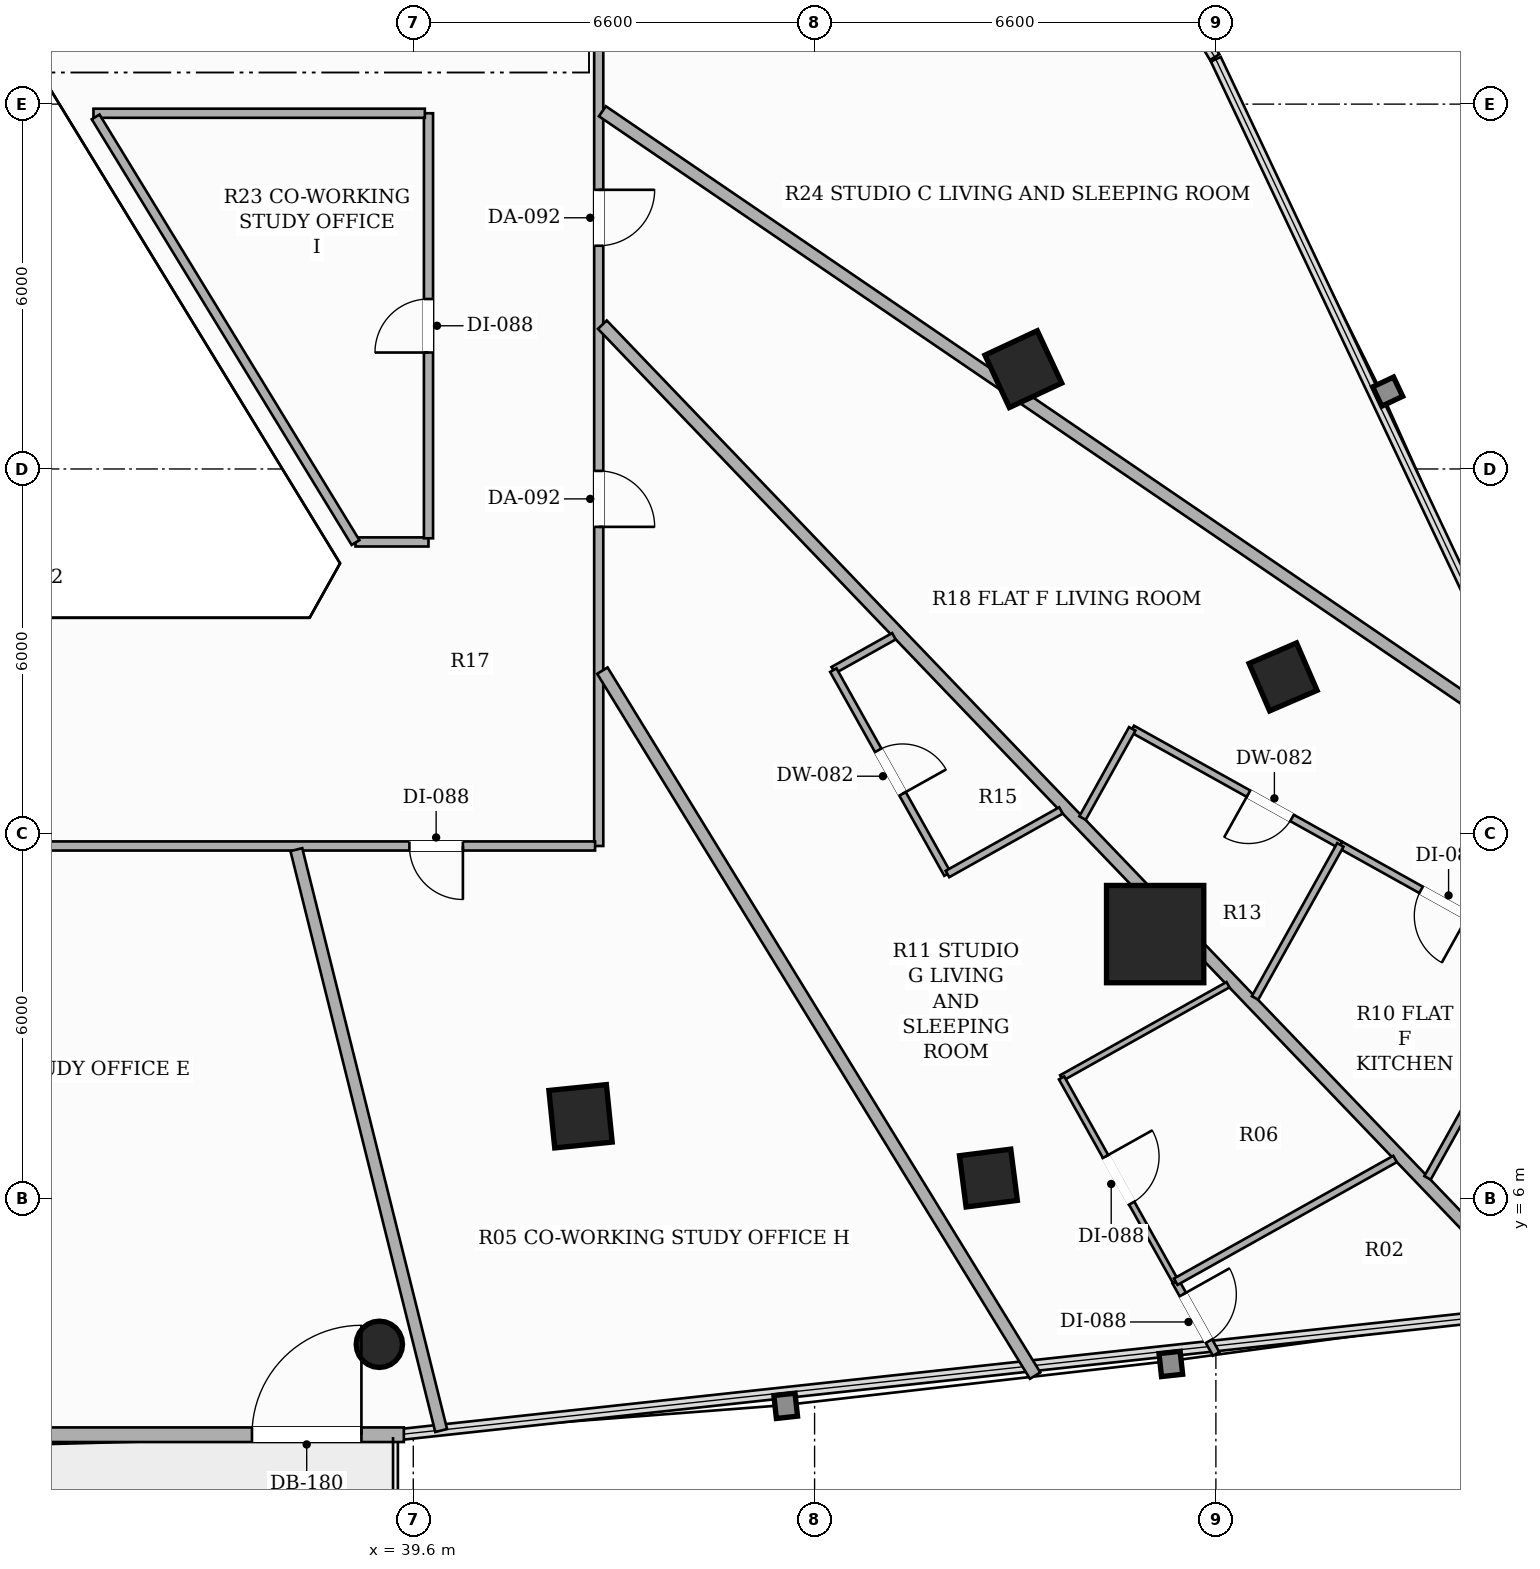
"""IFC4 building model, lengths in metres.
Left out: names, types, materials, properties, quantities, classifications, styles, units other than length and angle.
Written with IfcOpenShell. Run it as: python <this file> out.ifc"""

import sys

from ifc_helpers import new_model, si_unit, direction, frame, frame_2d, origin, origin_2d, place, context, subcontext, project, spatial, rectangle, hollow_rectangle, hollow_circle, extrude, element, fill, save


model = new_model("IFC4")
c1 = context("Model", 3, precision=1e-05, world=origin(), true_north=direction((0.0, 1.0)))
c2 = subcontext(c1, "Body", "Model", "MODEL_VIEW")
j1 = project(units=[si_unit("LENGTHUNIT", "METRE"), si_unit("PLANEANGLEUNIT", "RADIAN")], contexts=[c1])
p1 = place(None, origin())
s1 = spatial("IfcSite", under=j1, at=p1, CompositionType="ELEMENT")
p2 = place(p1, origin())
s2 = spatial("IfcBuilding", under=s1, at=p2, CompositionType="ELEMENT")
p3 = place(p2, frame((0.0, 0.0, 80.75)))
s3 = spatial("IfcBuildingStorey", under=s2, at=p3, CompositionType="ELEMENT", Elevation=80.75)
p4 = place(p3, frame((51.801, 10.351, 0.0), z_axis=(0.0, 0.0, 1.0), x_axis=(1.0, 0.0, 0.0)))
e1 = element("IfcColumn", 1, at=p4, inside=s3, PredefinedType="COLUMN", context=c2, shape_type="SweptSolid", body=[
    extrude(hollow_rectangle(XDim=1.6, YDim=1.6, WallThickness=0.05, at=origin_2d()), origin(), (0.0, 0.0, 1.0), 3.3),
])
for number, where, z_axis, x_axis in (
    (2, (42.351, 7.355, 0.0), (0.0, 0.0, 1.0), (0.995, 0.101, 0.0)),
    (3, (49.633, 19.642, 0.0), (0.0, 0.0, 1.0), (-0.423, 0.906, 0.0)),
):
    element("IfcColumn", number, at=place(p3, frame(where, z_axis=z_axis, x_axis=x_axis)), inside=s3, PredefinedType="COLUMN", context=c2, shape_type="SweptSolid", body=[
        extrude(hollow_rectangle(XDim=0.95, YDim=0.95, WallThickness=0.032, at=origin_2d()), origin(), (0.0, 0.0, 1.0), 3.3),
    ])
for number, where, z_axis, x_axis in (
    (4, (49.059, 6.339, 0.0), (0.0, 0.0, 1.0), (0.992, 0.127, 0.0)),
    (5, (53.905, 14.58, 0.0), (0.0, 0.0, 1.0), (-0.397, 0.918, 0.0)),
):
    element("IfcColumn", number, at=place(p3, frame(where, z_axis=z_axis, x_axis=x_axis)), inside=s3, PredefinedType="COLUMN", context=c2, shape_type="SweptSolid", body=[
        extrude(hollow_rectangle(XDim=0.85, YDim=0.85, WallThickness=0.028, at=origin_2d()), origin(), (0.0, 0.0, 1.0), 3.3),
    ])
p5 = place(p3, frame((39.042, 3.605, 0.0), z_axis=(0.0, 0.0, 1.0), x_axis=(1.0, 0.0, 0.0)))
e6 = element("IfcColumn", 6, at=p5, inside=s3, PredefinedType="COLUMN", context=c2, shape_type="SweptSolid", body=[
    extrude(hollow_circle(Radius=0.381, WallThickness=0.022, at=origin_2d()), origin(), (0.0, 0.0, 1.0), 3.3),
])
p6 = place(p3, frame((26.554, 2.118, 0.0), z_axis=(0.0, 0.0, 1.0), x_axis=(1.0, 0.0, 0.0)))
e7 = element("IfcWall", 7, at=p6, inside=s3, PredefinedType="SOLIDWALL", context=c2, shape_type="SweptSolid", body=[
    extrude(rectangle(XDim=12.891, YDim=0.24, at=frame_2d((6.446, 0.0))), origin(), (0.0, 0.0, 1.0), 2.624),
])
p7 = place(p6, frame((10.393, 0.0, 0.0)))
e8 = element("IfcOpeningElement", 8, at=p7, cuts=e7, PredefinedType="OPENING", context=c2, shape_type="SweptSolid", body=[
    extrude(rectangle(XDim=1.8, YDim=2.2, at=frame_2d((0.9, 1.1))), frame((0.0, 0.13, 0.0), z_axis=(0.0, -1.0, 0.0), x_axis=(1.0, 0.0, 0.0)), (0.0, 0.0, 1.0), 0.26),
])
p8 = place(p3, frame((42.65, 36.84, 0.0), z_axis=(0.0, 0.0, 1.0), x_axis=(0.0, -1.0, 0.0)))
e9 = element("IfcWall", 9, at=p8, inside=s3, PredefinedType="PARTITIONING", context=c2, shape_type="SweptSolid", body=[
    extrude(rectangle(XDim=25.04, YDim=0.15, at=frame_2d((12.52, 0.0))), origin(), (0.0, 0.0, 1.0), 2.413),
])
p9 = place(p8, frame((6.171, 0.0, 0.0)))
e10 = element("IfcOpeningElement", 10, at=p9, cuts=e9, PredefinedType="OPENING", context=c2, shape_type="SweptSolid", body=[
    extrude(rectangle(XDim=0.92, YDim=2.15, at=frame_2d((0.46, 1.075))), frame((0.0, 0.085, 0.0), z_axis=(0.0, -1.0, 0.0), x_axis=(1.0, 0.0, 0.0)), (0.0, 0.0, 1.0), 0.17),
])
p10 = place(p8, frame((14.249, 0.0, 0.0)))
e11 = element("IfcOpeningElement", 11, at=p10, cuts=e9, PredefinedType="OPENING", context=c2, shape_type="SweptSolid", body=[
    extrude(rectangle(XDim=0.92, YDim=2.15, at=frame_2d((0.46, 1.075))), frame((0.0, 0.085, 0.0), z_axis=(0.0, -1.0, 0.0), x_axis=(1.0, 0.0, 0.0)), (0.0, 0.0, 1.0), 0.17),
])
p11 = place(p8, frame((18.872, 0.0, 0.0)))
e12 = element("IfcOpeningElement", 12, at=p11, cuts=e9, PredefinedType="OPENING", context=c2, shape_type="SweptSolid", body=[
    extrude(rectangle(XDim=0.92, YDim=2.15, at=frame_2d((0.46, 1.075))), frame((0.0, 0.085, 0.0), z_axis=(0.0, -1.0, 0.0), x_axis=(1.0, 0.0, 0.0)), (0.0, 0.0, 1.0), 0.17),
])
p12 = place(p3, frame((42.59, 11.8, 0.0), z_axis=(0.0, 0.0, 1.0), x_axis=(-1.0, 0.0, 0.0)))
e13 = element("IfcWall", 13, at=p12, inside=s3, PredefinedType="PARTITIONING", context=c2, shape_type="SweptSolid", body=[
    extrude(rectangle(XDim=19.24, YDim=0.15, at=frame_2d((9.62, 0.0))), origin(), (0.0, 0.0, 1.0), 2.669),
])
p13 = place(p12, frame((9.24, 0.0, 0.0)))
e14 = element("IfcOpeningElement", 14, at=p13, cuts=e13, PredefinedType="OPENING", context=c2, shape_type="SweptSolid", body=[
    extrude(rectangle(XDim=0.88, YDim=2.1, at=frame_2d((0.44, 1.05))), frame((0.0, 0.085, 0.0), z_axis=(0.0, -1.0, 0.0), x_axis=(1.0, 0.0, 0.0)), (0.0, 0.0, 1.0), 0.17),
])
p14 = place(p12, frame((2.174, 0.0, 0.0)))
e15 = element("IfcOpeningElement", 15, at=p14, cuts=e13, PredefinedType="OPENING", context=c2, shape_type="SweptSolid", body=[
    extrude(rectangle(XDim=0.88, YDim=2.1, at=frame_2d((0.44, 1.05))), frame((0.0, 0.085, 0.0), z_axis=(0.0, -1.0, 0.0), x_axis=(1.0, 0.0, 0.0)), (0.0, 0.0, 1.0), 0.17),
])
p15 = place(p3, frame((38.65, 16.8, 0.0), z_axis=(0.0, 0.0, 1.0), x_axis=(1.0, 0.0, 0.0)))
e16 = element("IfcWall", 16, at=p15, inside=s3, PredefinedType="PARTITIONING", context=c2, shape_type="SweptSolid", body=[
    extrude(rectangle(XDim=1.2, YDim=0.15, at=frame_2d((0.6, 0.0))), origin(), (0.0, 0.0, 1.0), 3.06),
])
p16 = place(p3, frame((39.85, 16.86, 0.0), z_axis=(0.0, 0.0, 1.0), x_axis=(0.0, 1.0, 0.0)))
e17 = element("IfcWall", 17, at=p16, inside=s3, PredefinedType="PARTITIONING", context=c2, shape_type="SweptSolid", body=[
    extrude(rectangle(XDim=6.99, YDim=0.15, at=frame_2d((3.495, 0.0))), origin(), (0.0, 0.0, 1.0), 2.669),
])
p17 = place(p16, frame((3.055, 0.0, 0.0)))
e18 = element("IfcOpeningElement", 18, at=p17, cuts=e17, PredefinedType="OPENING", context=c2, shape_type="SweptSolid", body=[
    extrude(rectangle(XDim=0.88, YDim=2.1, at=frame_2d((0.44, 1.05))), frame((0.0, 0.085, 0.0), z_axis=(0.0, -1.0, 0.0), x_axis=(1.0, 0.0, 0.0)), (0.0, 0.0, 1.0), 0.17),
])
p18 = place(p3, frame((39.79, 23.85, 0.0), z_axis=(0.0, 0.0, 1.0), x_axis=(-1.0, 0.0, 0.0)))
e19 = element("IfcWall", 19, at=p18, inside=s3, PredefinedType="PARTITIONING", context=c2, shape_type="SweptSolid", body=[
    extrude(rectangle(XDim=5.45, YDim=0.15, at=frame_2d((2.725, 0.0))), origin(), (0.0, 0.0, 1.0), 2.669),
])
p19 = place(p3, frame((34.376, 23.79, 0.0), z_axis=(0.0, 0.0, 1.0), x_axis=(0.521108010454, -0.853490738931, 0.0)))
e20 = element("IfcWall", 20, at=p19, inside=s3, PredefinedType="PARTITIONING", context=c2, shape_type="SweptSolid", body=[
    extrude(rectangle(XDim=8.202, YDim=0.15, at=frame_2d((4.101, 0.0))), origin(), (0.0, 0.0, 1.0), 2.669),
])
p20 = place(p3, frame((58.165, 13.35, 0.0), z_axis=(0.0, 0.0, 1.0), x_axis=(-0.826341659386, 0.563169123766, 0.0)))
e21 = element("IfcWall", 21, at=p20, inside=s3, PredefinedType="PARTITIONING", context=c2, shape_type="SweptSolid", body=[
    extrude(rectangle(XDim=18.703, YDim=0.2, at=frame_2d((9.352, 0.0))), origin(), (0.0, 0.0, 1.0), 2.413),
])
p21 = place(p3, frame((37.677, 11.74, 0.0), z_axis=(0.0, 0.0, 1.0), x_axis=(0.241946282122, -0.970289645707, 0.0)))
e22 = element("IfcWall", 22, at=p21, inside=s3, PredefinedType="PARTITIONING", context=c2, shape_type="SweptSolid", body=[
    extrude(rectangle(XDim=9.845, YDim=0.2, at=frame_2d((4.923, 0.0))), origin(), (0.0, 0.0, 1.0), 2.413),
])
p22 = place(p3, frame((58.237, 4.179, 0.0), z_axis=(0.0, 0.0, 1.0), x_axis=(-0.69208567792, 0.721815360337, 0.0)))
e23 = element("IfcWall", 23, at=p22, inside=s3, PredefinedType="PARTITIONING", context=c2, shape_type="SweptSolid", body=[
    extrude(rectangle(XDim=22.435, YDim=0.2, at=frame_2d((11.218, 0.0))), origin(), (0.0, 0.0, 1.0), 2.413),
])
p23 = place(p3, frame((49.827, 3.09, 0.0), z_axis=(0.0, 0.0, 1.0), x_axis=(-0.523146880199, 0.852242536921, 0.0)))
e24 = element("IfcWall", 24, at=p23, inside=s3, PredefinedType="PARTITIONING", context=c2, shape_type="SweptSolid", body=[
    extrude(rectangle(XDim=13.604, YDim=0.2, at=frame_2d((6.802, 0.0))), origin(), (0.0, 0.0, 1.0), 2.413),
])
p24 = place(p3, frame((54.847, 11.818, 0.0), z_axis=(0.0, 0.0, 1.0), x_axis=(-0.87346578699, 0.486885529624, 0.0)))
e25 = element("IfcWall", 25, at=p24, inside=s3, PredefinedType="PARTITIONING", context=c2, shape_type="SweptSolid", body=[
    extrude(rectangle(XDim=3.919, YDim=0.12, at=frame_2d((1.959, 0.0))), origin(), (0.0, 0.0, 1.0), 2.413),
])
p25 = place(p24, frame((0.91, 0.0, 0.0)))
e26 = element("IfcOpeningElement", 26, at=p25, cuts=e25, PredefinedType="OPENING", context=c2, shape_type="SweptSolid", body=[
    extrude(rectangle(XDim=0.82, YDim=2.1, at=frame_2d((0.41, 1.05))), frame((0.0, 0.07, 0.0), z_axis=(0.0, -1.0, 0.0), x_axis=(1.0, 0.0, 0.0)), (0.0, 0.0, 1.0), 0.14),
])
p26 = place(p3, frame((51.424, 13.726, 0.0), z_axis=(0.0, 0.0, 1.0), x_axis=(-0.486605473044, -0.873621836726, 0.0)))
e27 = element("IfcWall", 27, at=p26, inside=s3, PredefinedType="PARTITIONING", context=c2, shape_type="SweptSolid", body=[
    extrude(rectangle(XDim=1.679, YDim=0.12, at=frame_2d((0.84, 0.0))), origin(), (0.0, 0.0, 1.0), 2.413),
])
p27 = place(p3, frame((58.27, 9.911, 0.0), z_axis=(0.0, 0.0, 1.0), x_axis=(-0.873560029318, 0.486716421727, 0.0)))
e28 = element("IfcWall", 28, at=p27, inside=s3, PredefinedType="PARTITIONING", context=c2, shape_type="SweptSolid", body=[
    extrude(rectangle(XDim=3.918, YDim=0.12, at=frame_2d((1.959, 0.0))), origin(), (0.0, 0.0, 1.0), 2.619),
])
p28 = place(p27, frame((1.519, 0.0, 0.0)))
e29 = element("IfcOpeningElement", 29, at=p28, cuts=e28, PredefinedType="OPENING", context=c2, shape_type="SweptSolid", body=[
    extrude(rectangle(XDim=0.88, YDim=2.1, at=frame_2d((0.44, 1.05))), frame((0.0, 0.07, 0.0), z_axis=(0.0, -1.0, 0.0), x_axis=(1.0, 0.0, 0.0)), (0.0, 0.0, 1.0), 0.14),
])
p29 = place(p3, frame((54.847, 11.818, 0.0), z_axis=(0.0, 0.0, 1.0), x_axis=(-0.486822226103, -0.873501070504, 0.0)))
e30 = element("IfcWall", 30, at=p29, inside=s3, PredefinedType="PARTITIONING", context=c2, shape_type="SweptSolid", body=[
    extrude(rectangle(XDim=2.882, YDim=0.12, at=frame_2d((1.441, 0.0))), origin(), (0.0, 0.0, 1.0), 3.06),
])
p30 = place(p3, frame((58.27, 9.911, 0.0), z_axis=(0.0, 0.0, 1.0), x_axis=(-0.486824622959, -0.873499734677, 0.0)))
e31 = element("IfcWall", 31, at=p30, inside=s3, PredefinedType="PARTITIONING", context=c2, shape_type="SweptSolid", body=[
    extrude(rectangle(XDim=4.086, YDim=0.12, at=frame_2d((2.043, 0.0))), origin(), (0.0, 0.0, 1.0), 3.06),
])
p31 = place(p3, frame((47.505, 15.249, 0.0), z_axis=(0.0, 0.0, 1.0), x_axis=(-0.872914025969, -0.487874064967, 0.0)))
e32 = element("IfcWall", 32, at=p31, inside=s3, PredefinedType="PARTITIONING", context=c2, shape_type="SweptSolid", body=[
    extrude(rectangle(XDim=1.142, YDim=0.12, at=frame_2d((0.571, 0.0))), origin(), (0.0, 0.0, 1.0), 3.06),
])
p32 = place(p3, frame((46.508, 14.692, 0.0), z_axis=(0.0, 0.0, 1.0), x_axis=(0.488483407483, -0.872573183529, 0.0)))
e33 = element("IfcWall", 33, at=p32, inside=s3, PredefinedType="PARTITIONING", context=c2, shape_type="SweptSolid", body=[
    extrude(rectangle(XDim=3.843, YDim=0.12, at=frame_2d((1.921, 0.0))), origin(), (0.0, 0.0, 1.0), 3.06),
])
p33 = place(p32, frame((1.511, 0.0, 0.0)))
e34 = element("IfcOpeningElement", 34, at=p33, cuts=e33, PredefinedType="OPENING", context=c2, shape_type="SweptSolid", body=[
    extrude(rectangle(XDim=0.82, YDim=2.1, at=frame_2d((0.41, 1.05))), frame((0.0, 0.07, 0.0), z_axis=(0.0, -1.0, 0.0), x_axis=(1.0, 0.0, 0.0)), (0.0, 0.0, 1.0), 0.14),
])
p34 = place(p3, frame((48.385, 11.339, 0.0), z_axis=(0.0, 0.0, 1.0), x_axis=(0.872618854318, 0.488401817246, 0.0)))
e35 = element("IfcWall", 35, at=p34, inside=s3, PredefinedType="PARTITIONING", context=c2, shape_type="SweptSolid", body=[
    extrude(rectangle(XDim=2.139, YDim=0.12, at=frame_2d((1.07, 0.0))), origin(), (0.0, 0.0, 1.0), 2.413),
])
p35 = place(p3, frame((52.139, 4.634, 0.0), z_axis=(0.0, 0.0, 1.0), x_axis=(0.488778203453, -0.872408085605, 0.0)))
e36 = element("IfcWall", 36, at=p35, inside=s3, PredefinedType="PARTITIONING", context=c2, shape_type="SweptSolid", body=[
    extrude(rectangle(XDim=1.361, YDim=0.12, at=frame_2d((0.68, 0.0))), origin(), (0.0, 0.0, 1.0), 2.619),
])
p36 = place(p35, frame((0.24, 0.0, 0.0)))
e37 = element("IfcOpeningElement", 37, at=p36, cuts=e36, PredefinedType="OPENING", context=c2, shape_type="SweptSolid", body=[
    extrude(rectangle(XDim=0.88, YDim=2.1, at=frame_2d((0.44, 1.05))), frame((0.0, 0.07, 0.0), z_axis=(0.0, -1.0, 0.0), x_axis=(1.0, 0.0, 0.0)), (0.0, 0.0, 1.0), 0.14),
])
p37 = place(p3, frame((52.999, 9.519, 0.0), z_axis=(0.0, 0.0, 1.0), x_axis=(-0.87247814598, -0.488653133406, 0.0)))
e38 = element("IfcWall", 38, at=p37, inside=s3, PredefinedType="PARTITIONING", context=c2, shape_type="SweptSolid", body=[
    extrude(rectangle(XDim=3.137, YDim=0.1, at=frame_2d((1.569, 0.0))), origin(), (0.0, 0.0, 1.0), 2.413),
])
p38 = place(p3, frame((50.262, 7.986, 0.0), z_axis=(0.0, 0.0, 1.0), x_axis=(0.488564666262, -0.872527688317, 0.0)))
e39 = element("IfcWall", 39, at=p38, inside=s3, PredefinedType="PARTITIONING", context=c2, shape_type="SweptSolid", body=[
    extrude(rectangle(XDim=3.842, YDim=0.1, at=frame_2d((1.921, 0.0))), origin(), (0.0, 0.0, 1.0), 2.413),
])
p39 = place(p38, frame((1.481, 0.0, 0.0)))
e40 = element("IfcOpeningElement", 40, at=p39, cuts=e39, PredefinedType="OPENING", context=c2, shape_type="SweptSolid", body=[
    extrude(rectangle(XDim=0.88, YDim=2.1, at=frame_2d((0.44, 1.05))), frame((0.0, 0.06, 0.0), z_axis=(0.0, -1.0, 0.0), x_axis=(1.0, 0.0, 0.0)), (0.0, 0.0, 1.0), 0.12),
])
p40 = place(p3, frame((52.139, 4.634, 0.0), z_axis=(0.0, 0.0, 1.0), x_axis=(0.87266304729, 0.488322850064, 0.0)))
e41 = element("IfcWall", 41, at=p40, inside=s3, PredefinedType="PARTITIONING", context=c2, shape_type="SweptSolid", body=[
    extrude(rectangle(XDim=4.135, YDim=0.12, at=frame_2d((2.067, 0.0))), origin(), (0.0, 0.0, 1.0), 2.619),
])
p41 = place(p7, origin())
e42 = element("IfcDoor", 42, at=p41, inside=s3, OperationType="SINGLE_SWING_RIGHT", PredefinedType="DOOR", context=c2, shape_type="SweptSolid", body=[
    extrude(rectangle(XDim=1.8, YDim=2.2, at=frame_2d((0.9, 1.1))), frame((0.0, 0.025, 0.0), z_axis=(0.0, -1.0, 0.0), x_axis=(1.0, 0.0, 0.0)), (0.0, 0.0, 1.0), 0.05),
])
fill(e8, e42)
p42 = place(p10, origin())
e43 = element("IfcDoor", 43, at=p42, inside=s3, OperationType="SINGLE_SWING_LEFT", PredefinedType="DOOR", context=c2, shape_type="SweptSolid", body=[
    extrude(rectangle(XDim=0.92, YDim=2.15, at=frame_2d((0.46, 1.075))), frame((0.0, 0.025, 0.0), z_axis=(0.0, -1.0, 0.0), x_axis=(1.0, 0.0, 0.0)), (0.0, 0.0, 1.0), 0.05),
])
fill(e11, e43)
p43 = place(p25, origin())
e44 = element("IfcDoor", 44, at=p43, inside=s3, OperationType="SINGLE_SWING_RIGHT", PredefinedType="DOOR", context=c2, shape_type="SweptSolid", body=[
    extrude(rectangle(XDim=0.82, YDim=2.1, at=frame_2d((0.41, 1.05))), frame((0.0, 0.025, 0.0), z_axis=(0.0, -1.0, 0.0), x_axis=(1.0, 0.0, 0.0)), (0.0, 0.0, 1.0), 0.05),
])
fill(e26, e44)
p44 = place(p28, origin())
e45 = element("IfcDoor", 45, at=p44, inside=s3, OperationType="SINGLE_SWING_LEFT", PredefinedType="DOOR", context=c2, shape_type="SweptSolid", body=[
    extrude(rectangle(XDim=0.88, YDim=2.1, at=frame_2d((0.44, 1.05))), frame((0.0, 0.025, 0.0), z_axis=(0.0, -1.0, 0.0), x_axis=(1.0, 0.0, 0.0)), (0.0, 0.0, 1.0), 0.05),
])
fill(e29, e45)
p45 = place(p11, origin())
e46 = element("IfcDoor", 46, at=p45, inside=s3, OperationType="SINGLE_SWING_RIGHT", PredefinedType="DOOR", context=c2, shape_type="SweptSolid", body=[
    extrude(rectangle(XDim=0.92, YDim=2.15, at=frame_2d((0.46, 1.075))), frame((0.0, 0.025, 0.0), z_axis=(0.0, -1.0, 0.0), x_axis=(1.0, 0.0, 0.0)), (0.0, 0.0, 1.0), 0.05),
])
fill(e12, e46)
p46 = place(p33, origin())
e47 = element("IfcDoor", 47, at=p46, inside=s3, OperationType="SINGLE_SWING_RIGHT", PredefinedType="DOOR", context=c2, shape_type="SweptSolid", body=[
    extrude(rectangle(XDim=0.82, YDim=2.1, at=frame_2d((0.41, 1.05))), frame((0.0, 0.025, 0.0), z_axis=(0.0, -1.0, 0.0), x_axis=(1.0, 0.0, 0.0)), (0.0, 0.0, 1.0), 0.05),
])
fill(e34, e47)
p47 = place(p36, origin())
e48 = element("IfcDoor", 48, at=p47, inside=s3, OperationType="SINGLE_SWING_LEFT", PredefinedType="DOOR", context=c2, shape_type="SweptSolid", body=[
    extrude(rectangle(XDim=0.88, YDim=2.1, at=frame_2d((0.44, 1.05))), frame((0.0, 0.025, 0.0), z_axis=(0.0, -1.0, 0.0), x_axis=(1.0, 0.0, 0.0)), (0.0, 0.0, 1.0), 0.05),
])
fill(e37, e48)
p48 = place(p39, origin())
e49 = element("IfcDoor", 49, at=p48, inside=s3, OperationType="SINGLE_SWING_LEFT", PredefinedType="DOOR", context=c2, shape_type="SweptSolid", body=[
    extrude(rectangle(XDim=0.88, YDim=2.1, at=frame_2d((0.44, 1.05))), frame((0.0, 0.025, 0.0), z_axis=(0.0, -1.0, 0.0), x_axis=(1.0, 0.0, 0.0)), (0.0, 0.0, 1.0), 0.05),
])
fill(e40, e49)
p49 = place(p14, origin())
e50 = element("IfcDoor", 50, at=p49, inside=s3, OperationType="SINGLE_SWING_LEFT", PredefinedType="DOOR", context=c2, shape_type="SweptSolid", body=[
    extrude(rectangle(XDim=0.88, YDim=2.1, at=frame_2d((0.44, 1.05))), frame((0.0, 0.025, 0.0), z_axis=(0.0, -1.0, 0.0), x_axis=(1.0, 0.0, 0.0)), (0.0, 0.0, 1.0), 0.05),
])
fill(e15, e50)
p50 = place(p17, origin())
e51 = element("IfcDoor", 51, at=p50, inside=s3, OperationType="SINGLE_SWING_LEFT", PredefinedType="DOOR", context=c2, shape_type="SweptSolid", body=[
    extrude(rectangle(XDim=0.88, YDim=2.1, at=frame_2d((0.44, 1.05))), frame((0.0, 0.025, 0.0), z_axis=(0.0, -1.0, 0.0), x_axis=(1.0, 0.0, 0.0)), (0.0, 0.0, 1.0), 0.05),
])
fill(e18, e51)
save(model, sys.argv[1])
